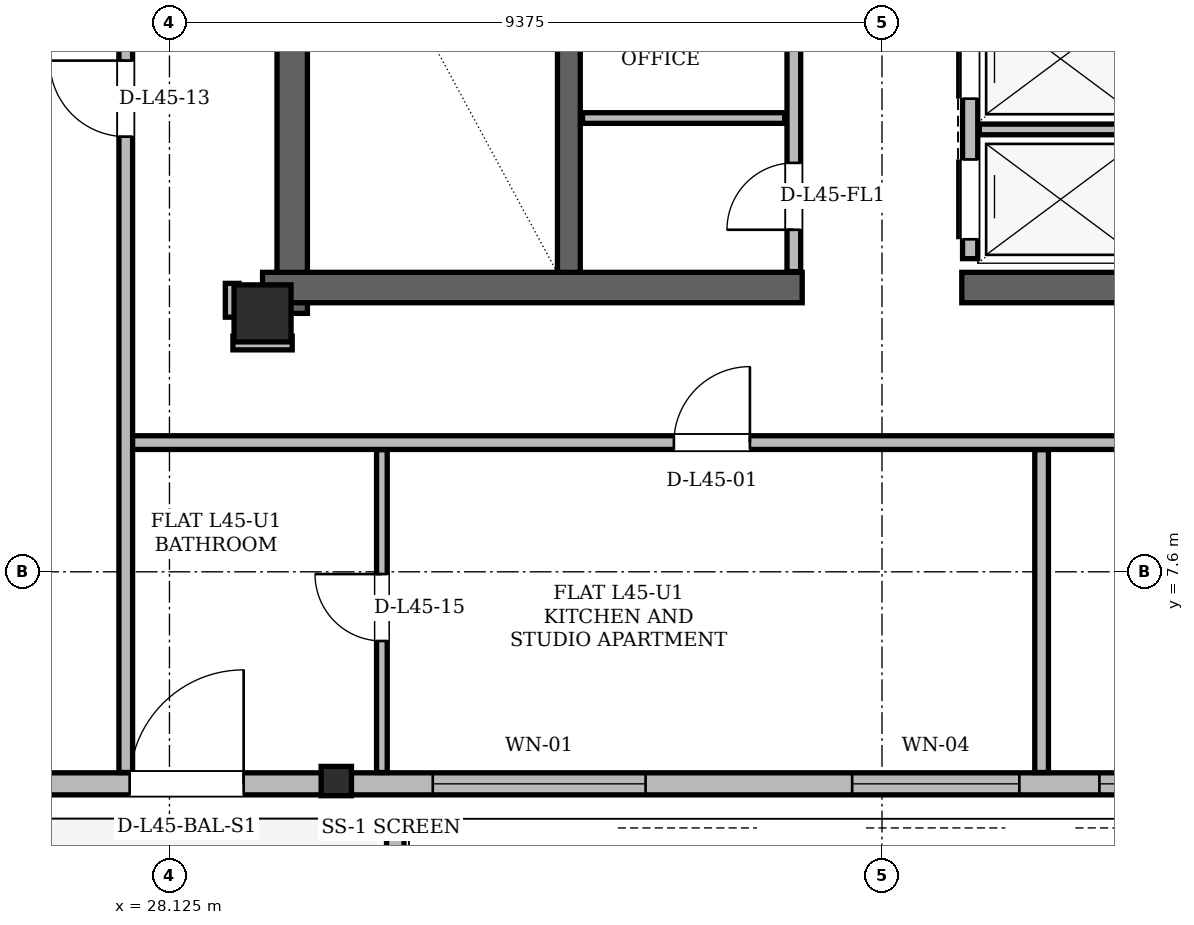
"""IFC4 building model, lengths in metres.
Left out: names, types, materials, properties, quantities, classifications, styles, units other than length and angle.
Written with IfcOpenShell. Run it as: python <this file> out.ifc"""

import sys

from ifc_helpers import new_model, si_unit, direction, frame, frame_2d, origin, origin_2d, place, context, subcontext, project, spatial, polyline, rectangle, hollow_rectangle, i_section, outline, extrude, element, fill, save


model = new_model("IFC4")
c1 = context("Model", 3, precision=1e-05, world=origin(), true_north=direction((0.0, 1.0)))
c2 = subcontext(c1, "Body", "Model", "MODEL_VIEW")
j1 = project(units=[si_unit("LENGTHUNIT", "METRE"), si_unit("PLANEANGLEUNIT", "RADIAN")], contexts=[c1])
p1 = place(None, origin())
s1 = spatial("IfcSite", under=j1, at=p1, CompositionType="ELEMENT")
p2 = place(p1, origin())
s2 = spatial("IfcBuilding", under=s1, at=p2, CompositionType="ELEMENT")
p3 = place(p2, frame((0.0, 0.0, 171.0)))
s3 = spatial("IfcBuildingStorey", under=s2, at=p3, CompositionType="ELEMENT", Elevation=171.0)
p4 = place(p3, frame((29.35, 11.0, 0.0), z_axis=(0.0, 0.0, 1.0), x_axis=(1.0, 0.0, 0.0)))
e1 = element("IfcColumn", 1, at=p4, inside=s3, PredefinedType="COLUMN", context=c2, shape_type="SweptSolid", body=[
    extrude(hollow_rectangle(XDim=0.75, YDim=0.75, WallThickness=0.06, at=origin_2d()), origin(), (0.0, 0.0, 1.0), 3.6),
])
p5 = place(p3, frame((30.327, 4.811, 0.004), z_axis=(-0.003466518361, 0.020459255425, 0.999784677877), x_axis=(-0.98594770325, -0.167054262012, 0.0)))
e2 = element("IfcColumn", 2, at=p5, inside=s3, PredefinedType="COLUMN", context=c2, shape_type="SweptSolid", body=[
    extrude(i_section(OverallWidth=0.399, OverallDepth=0.386, WebThickness=0.021, FlangeThickness=0.033, at=origin_2d()), origin(), (0.0, 0.0, 1.0), 3.592),
])
p6 = place(p3, frame((29.74, 11.0, 0.0), z_axis=(0.0, 0.0, 1.0), x_axis=(0.0, 1.0, 0.0)))
e3 = element("IfcWall", 3, at=p6, inside=s3, PredefinedType="SHEAR", context=c2, shape_type="SweptSolid", body=[
    extrude(rectangle(XDim=13.3, YDim=0.4, at=frame_2d((6.65, 0.0))), origin(), (0.0, 0.0, 1.0), 3.38),
])
for number, where, z_axis, x_axis in (
    (4, (29.35, 11.34, 0.0), (0.0, 0.0, 1.0), (1.0, 0.0, 0.0)),
    (5, (38.55, 11.34, 0.0), (0.0, 0.0, 1.0), (1.0, 0.0, 0.0)),
):
    element("IfcWall", number, at=place(p3, frame(where, z_axis=z_axis, x_axis=x_axis)), inside=s3, PredefinedType="SHEAR", context=c2, shape_type="SweptSolid", body=[
        extrude(rectangle(XDim=7.1, YDim=0.4, at=frame_2d((3.55, 0.0))), origin(), (0.0, 0.0, 1.0), 3.38),
    ])
p7 = place(p3, frame((33.38, 11.54, 0.0), z_axis=(0.0, 0.0, 1.0), x_axis=(0.0, 1.0, 0.0)))
e6 = element("IfcWall", 6, at=p7, inside=s3, PredefinedType="SHEAR", context=c2, shape_type="SweptSolid", body=[
    extrude(rectangle(XDim=7.62, YDim=0.3, at=frame_2d((3.81, 0.0))), origin(), (0.0, 0.0, 1.0), 3.38),
])
p8 = place(p3, frame((19.567, 4.811, 0.0), z_axis=(0.0, 0.0, 1.0), x_axis=(1.0, 0.0, 0.0)))
e7 = element("IfcWall", 7, at=p8, inside=s3, PredefinedType="SOLIDWALL", context=c2, shape_type="SweptSolid", body=[
    extrude(rectangle(XDim=35.866, YDim=0.29, at=frame_2d((17.933, 0.0))), origin(), (0.0, 0.0, 1.0), 2.6),
])
p9 = place(p8, frame((8.034, 0.0, 0.0)))
e8 = element("IfcOpeningElement", 8, at=p9, cuts=e7, PredefinedType="OPENING", context=c2, shape_type="SweptSolid", body=[
    extrude(rectangle(XDim=1.5, YDim=2.2, at=frame_2d((0.75, 1.1))), frame((0.0, 0.145, 0.0), z_axis=(0.0, -1.0, 0.0), x_axis=(1.0, 0.0, 0.0)), (0.0, 0.0, 1.0), 0.29),
])
p10 = place(p8, frame((27.787, 0.0, 0.0)))
e9 = element("IfcOpeningElement", 9, at=p10, cuts=e7, PredefinedType="OPENING", context=c2, shape_type="SweptSolid", body=[
    extrude(rectangle(XDim=1.5, YDim=2.2, at=frame_2d((0.75, 1.1))), frame((0.0, 0.145, 0.0), z_axis=(0.0, -1.0, 0.0), x_axis=(1.0, 0.0, 0.0)), (0.0, 0.0, 1.0), 0.29),
])
p11 = place(p8, frame((12.023, 0.0, 0.85)))
e10 = element("IfcOpeningElement", 10, at=p11, cuts=e7, PredefinedType="OPENING", context=c2, shape_type="SweptSolid", body=[
    extrude(rectangle(XDim=2.8, YDim=1.64, at=frame_2d((1.4, 0.82))), frame((0.0, 0.145, 0.0), z_axis=(0.0, -1.0, 0.0), x_axis=(1.0, 0.0, 0.0)), (0.0, 0.0, 1.0), 0.29),
])
p12 = place(p8, frame((17.54, 0.0, 0.85)))
e11 = element("IfcOpeningElement", 11, at=p12, cuts=e7, PredefinedType="OPENING", context=c2, shape_type="SweptSolid", body=[
    extrude(rectangle(XDim=2.2, YDim=1.64, at=frame_2d((1.1, 0.82))), frame((0.0, 0.145, 0.0), z_axis=(0.0, -1.0, 0.0), x_axis=(1.0, 0.0, 0.0)), (0.0, 0.0, 1.0), 0.29),
])
p13 = place(p8, frame((26.198, 0.0, 0.85)))
e12 = element("IfcOpeningElement", 12, at=p13, cuts=e7, PredefinedType="OPENING", context=c2, shape_type="SweptSolid", body=[
    extrude(rectangle(XDim=1.2, YDim=1.48, at=frame_2d((0.6, 0.74))), frame((0.0, 0.145, 0.0), z_axis=(0.0, -1.0, 0.0), x_axis=(1.0, 0.0, 0.0)), (0.0, 0.0, 1.0), 0.29),
])
p14 = place(p8, frame((31.777, 0.0, 0.85)))
e13 = element("IfcOpeningElement", 13, at=p14, cuts=e7, PredefinedType="OPENING", context=c2, shape_type="SweptSolid", body=[
    extrude(rectangle(XDim=1.8, YDim=1.64, at=frame_2d((0.9, 0.82))), frame((0.0, 0.145, 0.0), z_axis=(0.0, -1.0, 0.0), x_axis=(1.0, 0.0, 0.0)), (0.0, 0.0, 1.0), 0.29),
])
p15 = place(p8, frame((20.794, 0.0, 0.85)))
e14 = element("IfcOpeningElement", 14, at=p15, cuts=e7, PredefinedType="OPENING", context=c2, shape_type="SweptSolid", body=[
    extrude(rectangle(XDim=1.2, YDim=1.48, at=frame_2d((0.6, 0.74))), frame((0.0, 0.145, 0.0), z_axis=(0.0, -1.0, 0.0), x_axis=(1.0, 0.0, 0.0)), (0.0, 0.0, 1.0), 0.29),
])
p16 = place(p8, frame((1.571, 0.0, 0.85)))
e15 = element("IfcOpeningElement", 15, at=p16, cuts=e7, PredefinedType="OPENING", context=c2, shape_type="SweptSolid", body=[
    extrude(rectangle(XDim=2.0, YDim=1.64, at=frame_2d((1.0, 0.82))), frame((0.0, 0.145, 0.0), z_axis=(0.0, -1.0, 0.0), x_axis=(1.0, 0.0, 0.0)), (0.0, 0.0, 1.0), 0.29),
])
p17 = place(p8, frame((0.53, 0.0, 0.85)))
e16 = element("IfcOpeningElement", 16, at=p17, cuts=e7, PredefinedType="OPENING", context=c2, shape_type="SweptSolid", body=[
    extrude(rectangle(XDim=0.7, YDim=1.2, at=frame_2d((0.35, 0.6))), frame((0.0, 0.145, 0.0), z_axis=(0.0, -1.0, 0.0), x_axis=(1.0, 0.0, 0.0)), (0.0, 0.0, 1.0), 0.29),
])
p18 = place(p3, frame((33.226, 43.275, 0.0), z_axis=(0.0, 0.0, 1.0), x_axis=(-0.499997229411, -0.866027003379, 0.0)))
e17 = element("IfcWall", 17, at=p18, inside=s3, PredefinedType="SOLIDWALL", context=c2, shape_type="SweptSolid", body=[
    extrude(rectangle(XDim=35.866, YDim=0.29, at=frame_2d((17.933, 0.0))), origin(), (0.0, 0.0, 1.0), 2.6),
])
p19 = place(p18, frame((8.034, 0.0, 0.0)))
e18 = element("IfcOpeningElement", 18, at=p19, cuts=e17, PredefinedType="OPENING", context=c2, shape_type="SweptSolid", body=[
    extrude(rectangle(XDim=1.5, YDim=2.2, at=frame_2d((0.75, 1.1))), frame((0.0, 0.145, 0.0), z_axis=(0.0, -1.0, 0.0), x_axis=(1.0, 0.0, 0.0)), (0.0, 0.0, 1.0), 0.29),
])
p20 = place(p18, frame((27.787, 0.0, 0.0)))
e19 = element("IfcOpeningElement", 19, at=p20, cuts=e17, PredefinedType="OPENING", context=c2, shape_type="SweptSolid", body=[
    extrude(rectangle(XDim=1.5, YDim=2.2, at=frame_2d((0.75, 1.1))), frame((0.0, 0.145, 0.0), z_axis=(0.0, -1.0, 0.0), x_axis=(1.0, 0.0, 0.0)), (0.0, 0.0, 1.0), 0.29),
])
p21 = place(p18, frame((33.63, 0.0, 0.85)))
e20 = element("IfcOpeningElement", 20, at=p21, cuts=e17, PredefinedType="OPENING", context=c2, shape_type="SweptSolid", body=[
    extrude(rectangle(XDim=1.2, YDim=1.48, at=frame_2d((0.6, 0.74))), frame((0.0, 0.145, 0.0), z_axis=(0.0, -1.0, 0.0), x_axis=(1.0, 0.0, 0.0)), (0.0, 0.0, 1.0), 0.29),
])
p22 = place(p18, frame((18.03, 0.0, 0.85)))
e21 = element("IfcOpeningElement", 21, at=p22, cuts=e17, PredefinedType="OPENING", context=c2, shape_type="SweptSolid", body=[
    extrude(rectangle(XDim=2.6, YDim=1.64, at=frame_2d((1.3, 0.82))), frame((0.0, 0.145, 0.0), z_axis=(0.0, -1.0, 0.0), x_axis=(1.0, 0.0, 0.0)), (0.0, 0.0, 1.0), 0.29),
])
p23 = place(p18, frame((26.121, 0.0, 0.85)))
e22 = element("IfcOpeningElement", 22, at=p23, cuts=e17, PredefinedType="OPENING", context=c2, shape_type="SweptSolid", body=[
    extrude(rectangle(XDim=1.2, YDim=1.48, at=frame_2d((0.6, 0.74))), frame((0.0, 0.145, 0.0), z_axis=(0.0, -1.0, 0.0), x_axis=(1.0, 0.0, 0.0)), (0.0, 0.0, 1.0), 0.29),
])
p24 = place(p18, frame((12.379, 0.0, 0.85)))
e23 = element("IfcOpeningElement", 23, at=p24, cuts=e17, PredefinedType="OPENING", context=c2, shape_type="SweptSolid", body=[
    extrude(rectangle(XDim=1.2, YDim=1.48, at=frame_2d((0.6, 0.74))), frame((0.0, 0.145, 0.0), z_axis=(0.0, -1.0, 0.0), x_axis=(1.0, 0.0, 0.0)), (0.0, 0.0, 1.0), 0.29),
])
p25 = place(p18, frame((14.675, 0.0, 0.85)))
e24 = element("IfcOpeningElement", 24, at=p25, cuts=e17, PredefinedType="OPENING", context=c2, shape_type="SweptSolid", body=[
    extrude(rectangle(XDim=1.8, YDim=1.64, at=frame_2d((0.9, 0.82))), frame((0.0, 0.145, 0.0), z_axis=(0.0, -1.0, 0.0), x_axis=(1.0, 0.0, 0.0)), (0.0, 0.0, 1.0), 0.29),
])
p26 = place(p18, frame((2.162, 0.0, 0.85)))
e25 = element("IfcOpeningElement", 25, at=p26, cuts=e17, PredefinedType="OPENING", context=c2, shape_type="SweptSolid", body=[
    extrude(rectangle(XDim=2.0, YDim=1.64, at=frame_2d((1.0, 0.82))), frame((0.0, 0.145, 0.0), z_axis=(0.0, -1.0, 0.0), x_axis=(1.0, 0.0, 0.0)), (0.0, 0.0, 1.0), 0.29),
])
p27 = place(p3, frame((31.096, 4.213, 0.0), z_axis=(0.0, 0.0, 1.0), x_axis=(0.0, -1.0, 0.0)))
e26 = element("IfcWall", 26, at=p27, inside=s3, PredefinedType="PARAPET", context=c2, shape_type="SweptSolid", body=[
    extrude(outline(polyline([(0.0, 0.0), (2.042, 0.0), (2.042, 1.1), (0.0, 1.32), (0.0, 0.0)])), frame((0.0, 0.115, 0.0), z_axis=(0.0, -1.0, 0.0), x_axis=(1.0, 0.0, 0.0)), (0.0, 0.0, 1.0), 0.23),
])
p28 = place(p3, frame((36.34, 11.55, 0.0), z_axis=(0.0, 0.0, 1.0), x_axis=(0.0, 1.0, 0.0)))
e27 = element("IfcWall", 27, at=p28, inside=s3, PredefinedType="PARTITIONING", context=c2, shape_type="SweptSolid", body=[
    extrude(rectangle(XDim=5.55, YDim=0.18, at=frame_2d((2.775, 0.0))), origin(), (0.0, 0.0, 1.0), 3.38),
])
p29 = place(p28, frame((0.55, 0.0, 0.0)))
e28 = element("IfcOpeningElement", 28, at=p29, cuts=e27, PredefinedType="OPENING", context=c2, shape_type="SweptSolid", body=[
    extrude(rectangle(XDim=0.88, YDim=2.08, at=frame_2d((0.44, 1.04))), frame((0.0, 0.09, 0.0), z_axis=(0.0, -1.0, 0.0), x_axis=(1.0, 0.0, 0.0)), (0.0, 0.0, 1.0), 0.18),
])
p30 = place(p28, frame((3.25, 0.0, 0.0)))
e29 = element("IfcOpeningElement", 29, at=p30, cuts=e27, PredefinedType="OPENING", context=c2, shape_type="SweptSolid", body=[
    extrude(rectangle(XDim=0.88, YDim=2.08, at=frame_2d((0.44, 1.04))), frame((0.0, 0.09, 0.0), z_axis=(0.0, -1.0, 0.0), x_axis=(1.0, 0.0, 0.0)), (0.0, 0.0, 1.0), 0.18),
])
p31 = place(p3, frame((33.56, 13.57, 0.0), z_axis=(0.0, 0.0, 1.0), x_axis=(1.0, 0.0, 0.0)))
e30 = element("IfcWall", 30, at=p31, inside=s3, PredefinedType="PARTITIONING", context=c2, shape_type="SweptSolid", body=[
    extrude(rectangle(XDim=2.66, YDim=0.14, at=frame_2d((1.33, 0.0))), origin(), (0.0, 0.0, 1.0), 3.38),
])
p32 = place(p3, frame((38.66, 11.72, 0.0), z_axis=(0.0, 0.0, 1.0), x_axis=(0.0, 1.0, 0.0)))
e31 = element("IfcWall", 31, at=p32, inside=s3, PredefinedType="PARTITIONING", context=c2, shape_type="SweptSolid", body=[
    extrude(rectangle(XDim=9.1, YDim=0.2, at=frame_2d((4.55, 0.0))), origin(), (0.0, 0.0, 1.0), 3.38),
])
p33 = place(p32, frame((0.255, 0.0, 0.0)))
e32 = element("IfcOpeningElement", 32, at=p33, cuts=e31, PredefinedType="OPENING", context=c2, shape_type="SweptSolid", body=[
    extrude(rectangle(XDim=1.05, YDim=2.15, at=frame_2d((0.525, 1.075))), frame((0.0, 0.1, 0.0), z_axis=(0.0, -1.0, 0.0), x_axis=(1.0, 0.0, 0.0)), (0.0, 0.0, 1.0), 0.2),
])
p34 = place(p32, frame((2.105, 0.0, 0.0)))
e33 = element("IfcOpeningElement", 33, at=p34, cuts=e31, PredefinedType="OPENING", context=c2, shape_type="SweptSolid", body=[
    extrude(rectangle(XDim=1.05, YDim=2.15, at=frame_2d((0.525, 1.075))), frame((0.0, 0.1, 0.0), z_axis=(0.0, -1.0, 0.0), x_axis=(1.0, 0.0, 0.0)), (0.0, 0.0, 1.0), 0.2),
])
p35 = place(p32, frame((3.955, 0.0, 0.0)))
e34 = element("IfcOpeningElement", 34, at=p35, cuts=e31, PredefinedType="OPENING", context=c2, shape_type="SweptSolid", body=[
    extrude(rectangle(XDim=1.05, YDim=2.15, at=frame_2d((0.525, 1.075))), frame((0.0, 0.1, 0.0), z_axis=(0.0, -1.0, 0.0), x_axis=(1.0, 0.0, 0.0)), (0.0, 0.0, 1.0), 0.2),
])
p36 = place(p3, frame((38.78, 13.42, 0.0), z_axis=(0.0, 0.0, 1.0), x_axis=(1.0, 0.0, 0.0)))
e35 = element("IfcWall", 35, at=p36, inside=s3, PredefinedType="PARTITIONING", context=c2, shape_type="SweptSolid", body=[
    extrude(rectangle(XDim=2.66, YDim=0.14, at=frame_2d((1.33, 0.0))), origin(), (0.0, 0.0, 1.0), 3.38),
])
p37 = place(p3, frame((27.55, 9.3, 0.0), z_axis=(0.0, 0.0, 1.0), x_axis=(1.0, 0.0, 0.0)))
e36 = element("IfcWall", 36, at=p37, inside=s3, PredefinedType="PARTITIONING", context=c2, shape_type="SweptSolid", body=[
    extrude(rectangle(XDim=21.25, YDim=0.18, at=frame_2d((10.625, 0.0))), origin(), (0.0, 0.0, 1.0), 2.842),
])
p38 = place(p37, frame((7.212, 0.0, 0.0)))
e37 = element("IfcOpeningElement", 37, at=p38, cuts=e36, PredefinedType="OPENING", context=c2, shape_type="SweptSolid", body=[
    extrude(rectangle(XDim=1.0, YDim=2.18, at=frame_2d((0.5, 1.09))), frame((0.0, 0.09, 0.0), z_axis=(0.0, -1.0, 0.0), x_axis=(1.0, 0.0, 0.0)), (0.0, 0.0, 1.0), 0.18),
])
p39 = place(p37, frame((18.674, 0.0, 0.0)))
e38 = element("IfcOpeningElement", 38, at=p39, cuts=e36, PredefinedType="OPENING", context=c2, shape_type="SweptSolid", body=[
    extrude(rectangle(XDim=1.0, YDim=2.18, at=frame_2d((0.5, 1.09))), frame((0.0, 0.09, 0.0), z_axis=(0.0, -1.0, 0.0), x_axis=(1.0, 0.0, 0.0)), (0.0, 0.0, 1.0), 0.18),
])
p40 = place(p3, frame((28.96, 10.61, 0.0), z_axis=(0.0, 0.0, 1.0), x_axis=(1.0, 0.0, 0.0)))
e39 = element("IfcWall", 39, at=p40, inside=s3, PredefinedType="PARTITIONING", context=c2, shape_type="SweptSolid", body=[
    extrude(rectangle(XDim=0.78, YDim=0.18, at=frame_2d((0.39, 0.0))), origin(), (0.0, 0.0, 1.0), 3.38),
])
p41 = place(p3, frame((27.55, 4.96, 0.0), z_axis=(0.0, 0.0, 1.0), x_axis=(0.0, 1.0, 0.0)))
e40 = element("IfcWall", 40, at=p41, inside=s3, PredefinedType="PARTITIONING", context=c2, shape_type="SweptSolid", body=[
    extrude(rectangle(XDim=11.796, YDim=0.18, at=frame_2d((5.898, 0.0))), origin(), (0.0, 0.0, 1.0), 2.842),
])
p42 = place(p41, frame((8.366, 0.0, 0.0)))
e41 = element("IfcOpeningElement", 41, at=p42, cuts=e40, PredefinedType="OPENING", context=c2, shape_type="SweptSolid", body=[
    extrude(rectangle(XDim=1.0, YDim=2.18, at=frame_2d((0.5, 1.09))), frame((0.0, 0.09, 0.0), z_axis=(0.0, -1.0, 0.0), x_axis=(1.0, 0.0, 0.0)), (0.0, 0.0, 1.0), 0.18),
])
p43 = place(p3, frame((28.95, 10.95, 0.0), z_axis=(0.0, 0.0, 1.0), x_axis=(0.0, 1.0, 0.0)))
e42 = element("IfcWall", 42, at=p43, inside=s3, PredefinedType="PARTITIONING", context=c2, shape_type="SweptSolid", body=[
    extrude(rectangle(XDim=0.445, YDim=0.18, at=frame_2d((0.223, 0.0))), origin(), (0.0, 0.0, 1.0), 2.842),
])
p44 = place(p3, frame((30.92, 4.96, 0.0), z_axis=(0.0, 0.0, 1.0), x_axis=(0.0, 1.0, 0.0)))
e43 = element("IfcWall", 43, at=p44, inside=s3, PredefinedType="PARTITIONING", context=c2, shape_type="SweptSolid", body=[
    extrude(rectangle(XDim=4.246, YDim=0.14, at=frame_2d((2.123, 0.0))), origin(), (0.0, 0.0, 1.0), 2.966),
])
p45 = place(p44, frame((1.731, 0.0, 0.0)))
e44 = element("IfcOpeningElement", 44, at=p45, cuts=e43, PredefinedType="OPENING", context=c2, shape_type="SweptSolid", body=[
    extrude(rectangle(XDim=0.88, YDim=2.08, at=frame_2d((0.44, 1.04))), frame((0.0, 0.07, 0.0), z_axis=(0.0, -1.0, 0.0), x_axis=(1.0, 0.0, 0.0)), (0.0, 0.0, 1.0), 0.14),
])
p46 = place(p3, frame((39.6, 4.96, 0.0), z_axis=(0.0, 0.0, 1.0), x_axis=(0.0, 1.0, 0.0)))
e45 = element("IfcWall", 45, at=p46, inside=s3, PredefinedType="PARTITIONING", context=c2, shape_type="SweptSolid", body=[
    extrude(rectangle(XDim=4.246, YDim=0.18, at=frame_2d((2.123, 0.0))), origin(), (0.0, 0.0, 1.0), 3.38),
])
p47 = place(p9, origin())
e46 = element("IfcDoor", 46, at=p47, inside=s3, OperationType="SINGLE_SWING_RIGHT", PredefinedType="DOOR", context=c2, shape_type="SweptSolid", body=[
    extrude(rectangle(XDim=1.5, YDim=2.2, at=frame_2d((0.75, 1.1))), frame((0.0, 0.025, 0.0), z_axis=(0.0, -1.0, 0.0), x_axis=(1.0, 0.0, 0.0)), (0.0, 0.0, 1.0), 0.05),
])
fill(e8, e46)
p48 = place(p11, origin())
e47 = element("IfcWindow", 47, at=p48, inside=s3, PartitioningType="SINGLE_PANEL", PredefinedType="WINDOW", context=c2, shape_type="SweptSolid", body=[
    extrude(rectangle(XDim=2.8, YDim=1.64, at=frame_2d((1.4, 0.82))), frame((0.0, 0.03, 0.0), z_axis=(0.0, -1.0, 0.0), x_axis=(1.0, 0.0, 0.0)), (0.0, 0.0, 1.0), 0.06),
])
fill(e10, e47)
p49 = place(p12, origin())
e48 = element("IfcWindow", 48, at=p49, inside=s3, PartitioningType="SINGLE_PANEL", PredefinedType="WINDOW", context=c2, shape_type="SweptSolid", body=[
    extrude(rectangle(XDim=2.2, YDim=1.64, at=frame_2d((1.1, 0.82))), frame((0.0, 0.03, 0.0), z_axis=(0.0, -1.0, 0.0), x_axis=(1.0, 0.0, 0.0)), (0.0, 0.0, 1.0), 0.06),
])
fill(e11, e48)
p50 = place(p15, origin())
e49 = element("IfcWindow", 49, at=p50, inside=s3, PartitioningType="SINGLE_PANEL", PredefinedType="WINDOW", context=c2, shape_type="SweptSolid", body=[
    extrude(rectangle(XDim=1.2, YDim=1.48, at=frame_2d((0.6, 0.74))), frame((0.0, 0.03, 0.0), z_axis=(0.0, -1.0, 0.0), x_axis=(1.0, 0.0, 0.0)), (0.0, 0.0, 1.0), 0.06),
])
fill(e14, e49)
p51 = place(p29, origin())
e50 = element("IfcDoor", 50, at=p51, inside=s3, OperationType="SINGLE_SWING_LEFT", PredefinedType="DOOR", context=c2, shape_type="SweptSolid", body=[
    extrude(rectangle(XDim=0.88, YDim=2.08, at=frame_2d((0.44, 1.04))), frame((0.0, 0.025, 0.0), z_axis=(0.0, -1.0, 0.0), x_axis=(1.0, 0.0, 0.0)), (0.0, 0.0, 1.0), 0.05),
])
fill(e28, e50)
p52 = place(p33, origin())
e51 = element("IfcDoor", 51, at=p52, inside=s3, OperationType="SLIDING_TO_RIGHT", PredefinedType="DOOR", context=c2, shape_type="SweptSolid", body=[
    extrude(rectangle(XDim=1.05, YDim=2.15, at=frame_2d((0.525, 1.075))), frame((0.0, 0.025, 0.0), z_axis=(0.0, -1.0, 0.0), x_axis=(1.0, 0.0, 0.0)), (0.0, 0.0, 1.0), 0.05),
])
fill(e32, e51)
p53 = place(p34, origin())
e52 = element("IfcDoor", 52, at=p53, inside=s3, OperationType="SLIDING_TO_LEFT", PredefinedType="DOOR", context=c2, shape_type="SweptSolid", body=[
    extrude(rectangle(XDim=1.05, YDim=2.15, at=frame_2d((0.525, 1.075))), frame((0.0, 0.025, 0.0), z_axis=(0.0, -1.0, 0.0), x_axis=(1.0, 0.0, 0.0)), (0.0, 0.0, 1.0), 0.05),
])
fill(e33, e52)
p54 = place(p38, origin())
e53 = element("IfcDoor", 53, at=p54, inside=s3, OperationType="SINGLE_SWING_RIGHT", PredefinedType="DOOR", context=c2, shape_type="SweptSolid", body=[
    extrude(rectangle(XDim=1.0, YDim=2.18, at=frame_2d((0.5, 1.09))), frame((0.0, 0.025, 0.0), z_axis=(0.0, -1.0, 0.0), x_axis=(1.0, 0.0, 0.0)), (0.0, 0.0, 1.0), 0.05),
])
fill(e37, e53)
p55 = place(p42, origin())
e54 = element("IfcDoor", 54, at=p55, inside=s3, OperationType="SINGLE_SWING_RIGHT", PredefinedType="DOOR", context=c2, shape_type="SweptSolid", body=[
    extrude(rectangle(XDim=1.0, YDim=2.18, at=frame_2d((0.5, 1.09))), frame((0.0, 0.025, 0.0), z_axis=(0.0, -1.0, 0.0), x_axis=(1.0, 0.0, 0.0)), (0.0, 0.0, 1.0), 0.05),
])
fill(e41, e54)
p56 = place(p45, origin())
e55 = element("IfcDoor", 55, at=p56, inside=s3, OperationType="SINGLE_SWING_RIGHT", PredefinedType="DOOR", context=c2, shape_type="SweptSolid", body=[
    extrude(rectangle(XDim=0.88, YDim=2.08, at=frame_2d((0.44, 1.04))), frame((0.0, 0.025, 0.0), z_axis=(0.0, -1.0, 0.0), x_axis=(1.0, 0.0, 0.0)), (0.0, 0.0, 1.0), 0.05),
])
fill(e44, e55)
save(model, sys.argv[1])
